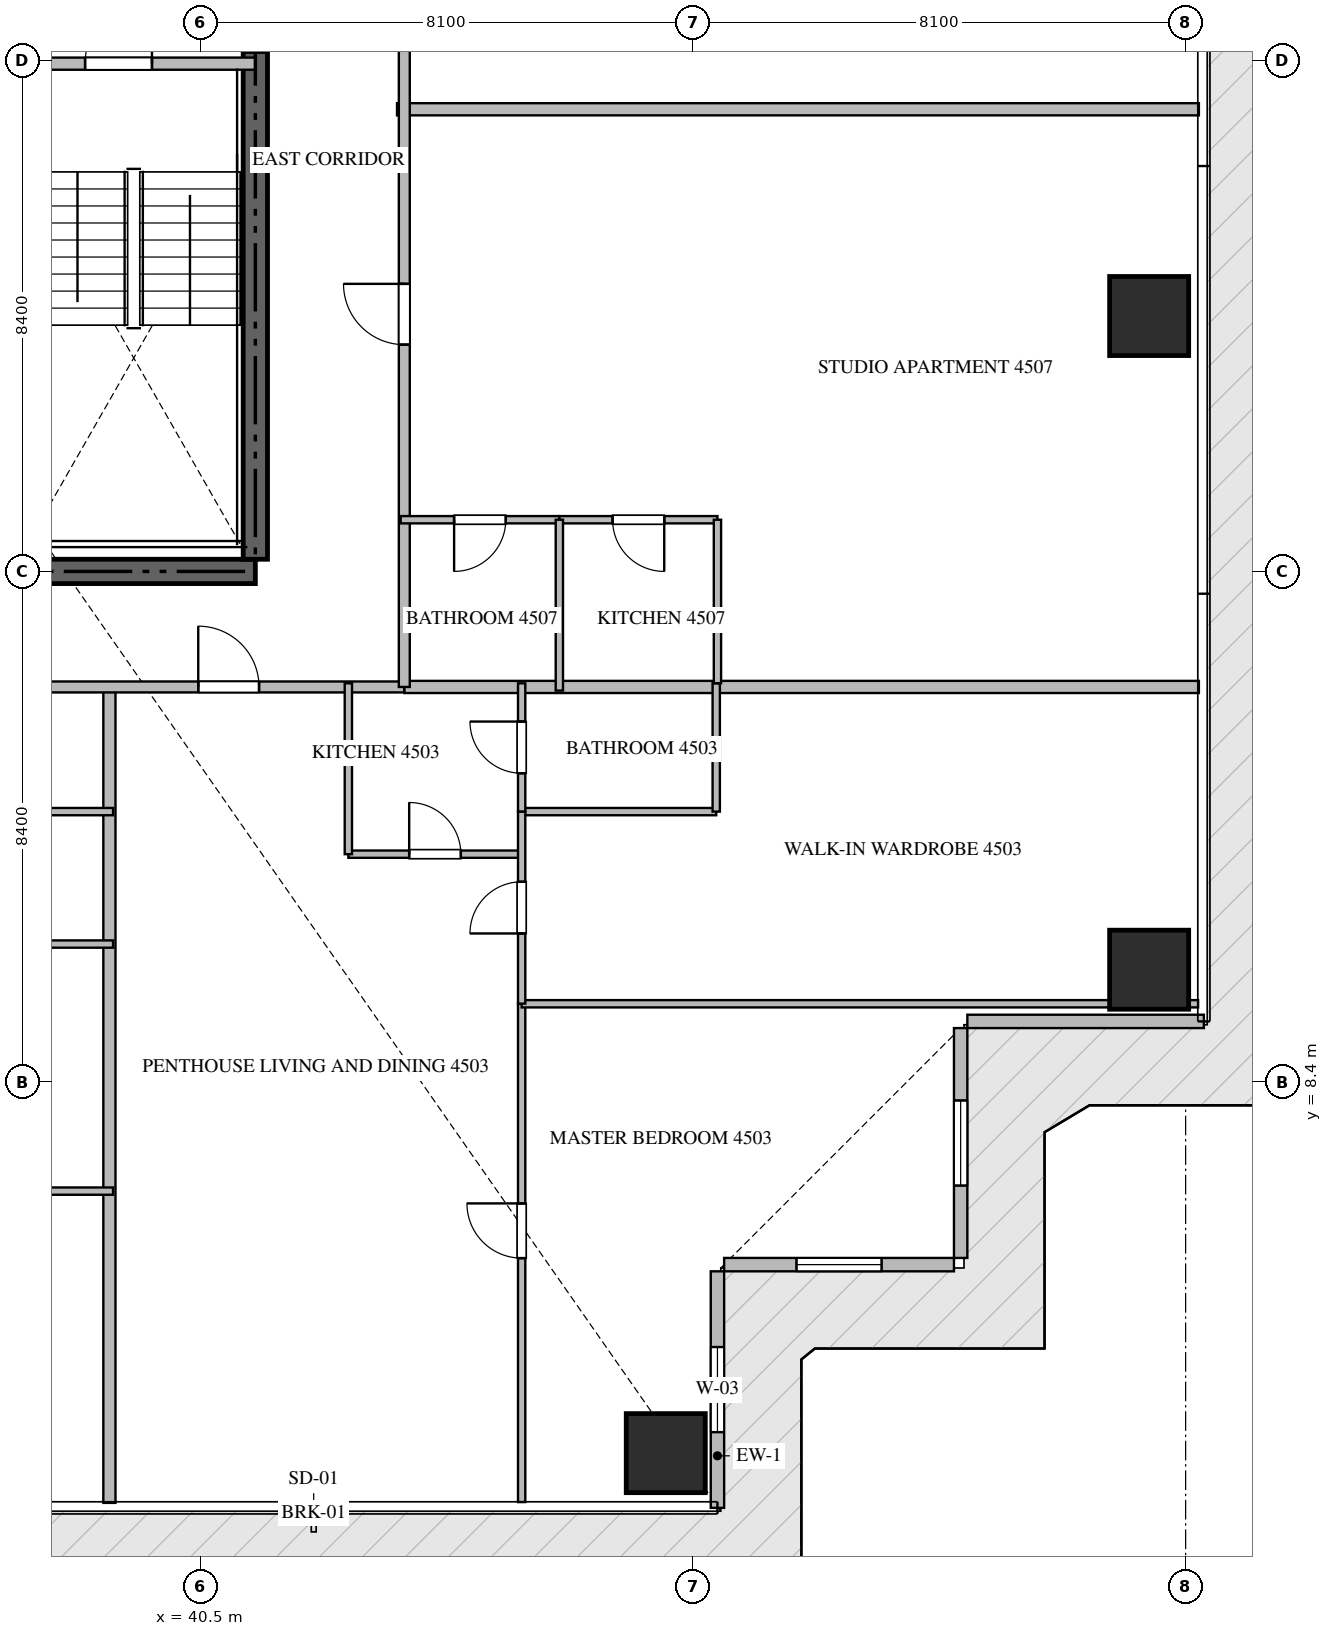
"""IFC4 building model, lengths in metres.
Left out: names, types, materials, properties, quantities, classifications, styles, units other than length and angle.
Written with IfcOpenShell. Run it as: python <this file> out.ifc"""

import sys

from ifc_helpers import new_model, si_unit, direction, frame, frame_2d, origin, origin_2d, place, context, subcontext, project, spatial, rectangle, extrude, source, transform, mapped, element, fill, save


model = new_model("IFC4")
c1 = context("Model", 3, precision=1e-05, world=origin(), true_north=direction((0.0, 1.0)))
c2 = subcontext(c1, "Body", "Model", "MODEL_VIEW")
j1 = project(units=[si_unit("LENGTHUNIT", "METRE"), si_unit("PLANEANGLEUNIT", "RADIAN")], contexts=[c1])
p1 = place(None, origin())
s1 = spatial("IfcSite", under=j1, at=p1, CompositionType="ELEMENT")
p2 = place(p1, origin())
s2 = spatial("IfcBuilding", under=s1, at=p2, CompositionType="ELEMENT")
p3 = place(p2, frame((0.0, 0.0, 180.15)))
s3 = spatial("IfcBuildingStorey", under=s2, at=p3, CompositionType="ELEMENT", Elevation=180.15)
p4 = place(p3, frame((23.4, 16.8, -0.26), z_axis=(0.0, 0.0, 1.0), x_axis=(1.0, 0.0, 0.0)))
e1 = element("IfcWall", 1, at=p4, inside=s3, PredefinedType="SHEAR", context=c2, shape_type="SweptSolid", body=[
    extrude(rectangle(XDim=18.0, YDim=0.4, at=frame_2d((9.0, 0.0))), origin(), (0.0, 0.0, 1.0), 3.748),
])
p5 = place(p3, frame((41.4, 17.0, -0.26), z_axis=(0.0, 0.0, 1.0), x_axis=(0.0, 1.0, 0.0)))
e2 = element("IfcWall", 2, at=p5, inside=s3, PredefinedType="SHEAR", context=c2, shape_type="SweptSolid", body=[
    extrude(rectangle(XDim=8.35, YDim=0.4, at=frame_2d((4.175, 0.0))), origin(), (0.0, 0.0, 1.0), 3.748),
])
m1 = source(origin(), c2, "Body", "SweptSolid", [
    extrude(rectangle(XDim=1.3, YDim=1.3, at=origin_2d()), origin(), (0.0, 0.0, 1.0), 3.75),
])
for number, where, z_axis, x_axis in (
    (3, (48.15, 2.3, -0.26), (0.0, 0.0, 1.0), (1.0, 0.0, 0.0)),
    (4, (56.1, 10.25, -0.26), (0.0, 0.0, 1.0), (1.0, 0.0, 0.0)),
    (5, (56.1, 21.0, -0.26), (0.0, 0.0, 1.0), (1.0, 0.0, 0.0)),
):
    element("IfcColumn", number, at=place(p3, frame(where, z_axis=z_axis, x_axis=x_axis)), inside=s3, PredefinedType="COLUMN", context=c2, shape_type="MappedRepresentation", body=[
        mapped(m1, transform((0.0, 0.0, 0.0), scale=1.0)),
    ])
p6 = place(p3, frame((49.0, 1.4, 0.0), z_axis=(0.0, 0.0, 1.0), x_axis=(0.0, 1.0, 0.0)))
e6 = element("IfcWall", 6, at=p6, inside=s3, PredefinedType="ELEMENTEDWALL", context=c2, shape_type="SweptSolid", body=[
    extrude(rectangle(XDim=3.89, YDim=0.22, at=frame_2d((1.945, 0.0))), origin(), (0.0, 0.0, 1.0), 3.475),
])
p7 = place(p6, frame((1.245, 0.0, 0.65)))
e7 = element("IfcOpeningElement", 7, at=p7, cuts=e6, PredefinedType="OPENING", context=c2, shape_type="SweptSolid", body=[
    extrude(rectangle(XDim=1.4, YDim=2.05, at=frame_2d((0.7, 1.025))), frame((0.0, 0.12, 0.0), z_axis=(0.0, -1.0, 0.0), x_axis=(1.0, 0.0, 0.0)), (0.0, 0.0, 1.0), 0.24),
])
p8 = place(p3, frame((49.11, 5.4, 0.0), z_axis=(0.0, 0.0, 1.0), x_axis=(1.0, 0.0, 0.0)))
e8 = element("IfcWall", 8, at=p8, inside=s3, PredefinedType="ELEMENTEDWALL", context=c2, shape_type="SweptSolid", body=[
    extrude(rectangle(XDim=3.78, YDim=0.22, at=frame_2d((1.89, 0.0))), origin(), (0.0, 0.0, 1.0), 3.475),
])
p9 = place(p8, frame((1.19, 0.0, 0.65)))
e9 = element("IfcOpeningElement", 9, at=p9, cuts=e8, PredefinedType="OPENING", context=c2, shape_type="SweptSolid", body=[
    extrude(rectangle(XDim=1.4, YDim=2.05, at=frame_2d((0.7, 1.025))), frame((0.0, 0.12, 0.0), z_axis=(0.0, -1.0, 0.0), x_axis=(1.0, 0.0, 0.0)), (0.0, 0.0, 1.0), 0.24),
])
p10 = place(p3, frame((53.0, 5.51, 0.0), z_axis=(0.0, 0.0, 1.0), x_axis=(0.0, 1.0, 0.0)))
e10 = element("IfcWall", 10, at=p10, inside=s3, PredefinedType="ELEMENTEDWALL", context=c2, shape_type="SweptSolid", body=[
    extrude(rectangle(XDim=3.78, YDim=0.22, at=frame_2d((1.89, 0.0))), origin(), (0.0, 0.0, 1.0), 3.475),
])
p11 = place(p10, frame((1.19, 0.0, 0.65)))
e11 = element("IfcOpeningElement", 11, at=p11, cuts=e10, PredefinedType="OPENING", context=c2, shape_type="SweptSolid", body=[
    extrude(rectangle(XDim=1.4, YDim=2.05, at=frame_2d((0.7, 1.025))), frame((0.0, 0.12, 0.0), z_axis=(0.0, -1.0, 0.0), x_axis=(1.0, 0.0, 0.0)), (0.0, 0.0, 1.0), 0.24),
])
p12 = place(p3, frame((53.11, 9.4, 0.0), z_axis=(0.0, 0.0, 1.0), x_axis=(1.0, 0.0, 0.0)))
e12 = element("IfcWall", 12, at=p12, inside=s3, PredefinedType="ELEMENTEDWALL", context=c2, shape_type="SweptSolid", body=[
    extrude(rectangle(XDim=3.89, YDim=0.22, at=frame_2d((1.945, 0.0))), origin(), (0.0, 0.0, 1.0), 3.475),
])
p13 = place(p3, frame((36.95, 25.15, 0.0), z_axis=(0.0, 0.0, 1.0), x_axis=(1.0, 0.0, 0.0)))
e13 = element("IfcWall", 13, at=p13, inside=s3, PredefinedType="STANDARD", context=c2, shape_type="SweptSolid", body=[
    extrude(rectangle(XDim=4.45, YDim=0.2, at=frame_2d((2.225, 0.0))), origin(), (0.0, 0.0, 1.0), 3.49),
])
p14 = place(p13, frame((1.65, 0.0, 0.0)))
e14 = element("IfcOpeningElement", 14, at=p14, cuts=e13, PredefinedType="OPENING", context=c2, shape_type="SweptSolid", body=[
    extrude(rectangle(XDim=1.1, YDim=2.15, at=frame_2d((0.55, 1.075))), frame((0.0, 0.11, 0.0), z_axis=(0.0, -1.0, 0.0), x_axis=(1.0, 0.0, 0.0)), (0.0, 0.0, 1.0), 0.22),
])
p15 = place(p3, frame((39.0, 1.482, 0.0), z_axis=(0.0, 0.0, 1.0), x_axis=(0.0, 1.0, 0.0)))
e15 = element("IfcWall", 15, at=p15, inside=s3, PredefinedType="PARTITIONING", context=c2, shape_type="SweptSolid", body=[
    extrude(rectangle(XDim=13.418, YDim=0.2, at=frame_2d((6.709, 0.0))), origin(), (0.0, 0.0, 1.0), 3.49),
])
p16 = place(p3, frame((43.73, 24.4, 0.0), z_axis=(0.0, 0.0, 1.0), x_axis=(1.0, 0.0, 0.0)))
e16 = element("IfcWall", 16, at=p16, inside=s3, PredefinedType="PARTITIONING", context=c2, shape_type="SweptSolid", body=[
    extrude(rectangle(XDim=13.188, YDim=0.2, at=frame_2d((6.594, 0.0))), origin(), (0.0, 0.0, 1.0), 3.49),
])
p17 = place(p3, frame((43.85, 14.9, 0.0), z_axis=(0.0, 0.0, 1.0), x_axis=(1.0, 0.0, 0.0)))
e17 = element("IfcWall", 17, at=p17, inside=s3, PredefinedType="PARTITIONING", context=c2, shape_type="SweptSolid", body=[
    extrude(rectangle(XDim=13.068, YDim=0.2, at=frame_2d((6.534, 0.0))), origin(), (0.0, 0.0, 1.0), 3.49),
])
p18 = place(p3, frame((20.952, 14.9, 0.0), z_axis=(0.0, 0.0, 1.0), x_axis=(1.0, 0.0, 0.0)))
e18 = element("IfcWall", 18, at=p18, inside=s3, PredefinedType="PARTITIONING", context=c2, shape_type="SweptSolid", body=[
    extrude(rectangle(XDim=22.896, YDim=0.18, at=frame_2d((11.448, 0.0))), origin(), (0.0, 0.0, 1.0), 3.49),
])
p19 = place(p18, frame((2.211, 0.0, 0.0)))
e19 = element("IfcOpeningElement", 19, at=p19, cuts=e18, PredefinedType="OPENING", context=c2, shape_type="SweptSolid", body=[
    extrude(rectangle(XDim=1.0, YDim=2.15, at=frame_2d((0.5, 1.075))), frame((0.0, 0.1, 0.0), z_axis=(0.0, -1.0, 0.0), x_axis=(1.0, 0.0, 0.0)), (0.0, 0.0, 1.0), 0.2),
])
p20 = place(p18, frame((6.7, 0.0, 0.0)))
e20 = element("IfcOpeningElement", 20, at=p20, cuts=e18, PredefinedType="OPENING", context=c2, shape_type="SweptSolid", body=[
    extrude(rectangle(XDim=1.0, YDim=2.15, at=frame_2d((0.5, 1.075))), frame((0.0, 0.1, 0.0), z_axis=(0.0, -1.0, 0.0), x_axis=(1.0, 0.0, 0.0)), (0.0, 0.0, 1.0), 0.2),
])
p21 = place(p18, frame((19.509, 0.0, 0.0)))
e21 = element("IfcOpeningElement", 21, at=p21, cuts=e18, PredefinedType="OPENING", context=c2, shape_type="SweptSolid", body=[
    extrude(rectangle(XDim=1.0, YDim=2.15, at=frame_2d((0.5, 1.075))), frame((0.0, 0.1, 0.0), z_axis=(0.0, -1.0, 0.0), x_axis=(1.0, 0.0, 0.0)), (0.0, 0.0, 1.0), 0.2),
])
p22 = place(p3, frame((43.85, 14.9, 0.0), z_axis=(0.0, 0.0, 1.0), x_axis=(0.0, 1.0, 0.0)))
e22 = element("IfcWall", 22, at=p22, inside=s3, PredefinedType="PARTITIONING", context=c2, shape_type="SweptSolid", body=[
    extrude(rectangle(XDim=18.7, YDim=0.18, at=frame_2d((9.35, 0.0))), origin(), (0.0, 0.0, 1.0), 3.49),
])
p23 = place(p22, frame((5.629, 0.0, 0.0)))
e23 = element("IfcOpeningElement", 23, at=p23, cuts=e22, PredefinedType="OPENING", context=c2, shape_type="SweptSolid", body=[
    extrude(rectangle(XDim=1.0, YDim=2.15, at=frame_2d((0.5, 1.075))), frame((0.0, 0.1, 0.0), z_axis=(0.0, -1.0, 0.0), x_axis=(1.0, 0.0, 0.0)), (0.0, 0.0, 1.0), 0.2),
])
p24 = place(p22, frame((10.709, 0.0, 0.0)))
e24 = element("IfcOpeningElement", 24, at=p24, cuts=e22, PredefinedType="OPENING", context=c2, shape_type="SweptSolid", body=[
    extrude(rectangle(XDim=1.0, YDim=2.15, at=frame_2d((0.5, 1.075))), frame((0.0, 0.1, 0.0), z_axis=(0.0, -1.0, 0.0), x_axis=(1.0, 0.0, 0.0)), (0.0, 0.0, 1.0), 0.2),
])
for number, where, z_axis, x_axis in (
    (25, (30.69, 6.609, 0.0), (0.0, 0.0, 1.0), (1.0, 0.0, 0.0)),
    (26, (30.69, 10.672, 0.0), (0.0, 0.0, 1.0), (1.0, 0.0, 0.0)),
    (27, (30.69, 12.85, 0.0), (0.0, 0.0, 1.0), (1.0, 0.0, 0.0)),
):
    element("IfcWall", number, at=place(p3, frame(where, z_axis=z_axis, x_axis=x_axis)), inside=s3, PredefinedType="PARTITIONING", context=c2, shape_type="SweptSolid", body=[
        extrude(rectangle(XDim=8.37, YDim=0.12, at=frame_2d((4.185, 0.0))), origin(), (0.0, 0.0, 1.0), 3.49),
    ])
p25 = place(p3, frame((42.93, 12.15, 0.0), z_axis=(0.0, 0.0, 1.0), x_axis=(1.0, 0.0, 0.0)))
e28 = element("IfcWall", 28, at=p25, inside=s3, PredefinedType="PARTITIONING", context=c2, shape_type="SweptSolid", body=[
    extrude(rectangle(XDim=2.85, YDim=0.12, at=frame_2d((1.425, 0.0))), origin(), (0.0, 0.0, 1.0), 3.49),
])
p26 = place(p25, frame((1.0, 0.0, 0.0)))
e29 = element("IfcOpeningElement", 29, at=p26, cuts=e28, PredefinedType="OPENING", context=c2, shape_type="SweptSolid", body=[
    extrude(rectangle(XDim=0.85, YDim=2.1, at=frame_2d((0.425, 1.05))), frame((0.0, 0.07, 0.0), z_axis=(0.0, -1.0, 0.0), x_axis=(1.0, 0.0, 0.0)), (0.0, 0.0, 1.0), 0.14),
])
p27 = place(p3, frame((42.93, 12.15, 0.0), z_axis=(0.0, 0.0, 1.0), x_axis=(0.0, 1.0, 0.0)))
e30 = element("IfcWall", 30, at=p27, inside=s3, PredefinedType="PARTITIONING", context=c2, shape_type="SweptSolid", body=[
    extrude(rectangle(XDim=2.81, YDim=0.12, at=frame_2d((1.405, 0.0))), origin(), (0.0, 0.0, 1.0), 3.49),
])
p28 = place(p3, frame((45.78, 1.495, 0.0), z_axis=(0.0, 0.0, 1.0), x_axis=(0.0, 1.0, 0.0)))
e31 = element("IfcWall", 31, at=p28, inside=s3, PredefinedType="PARTITIONING", context=c2, shape_type="SweptSolid", body=[
    extrude(rectangle(XDim=8.195, YDim=0.12, at=frame_2d((4.097, 0.0))), origin(), (0.0, 0.0, 1.0), 3.49),
])
p29 = place(p28, frame((4.012, 0.0, 0.0)))
e32 = element("IfcOpeningElement", 32, at=p29, cuts=e31, PredefinedType="OPENING", context=c2, shape_type="SweptSolid", body=[
    extrude(rectangle(XDim=0.9, YDim=2.1, at=frame_2d((0.45, 1.05))), frame((0.0, 0.07, 0.0), z_axis=(0.0, -1.0, 0.0), x_axis=(1.0, 0.0, 0.0)), (0.0, 0.0, 1.0), 0.14),
])
p30 = place(p3, frame((45.78, 9.69, 0.0), z_axis=(0.0, 0.0, 1.0), x_axis=(1.0, 0.0, 0.0)))
e33 = element("IfcWall", 33, at=p30, inside=s3, PredefinedType="PARTITIONING", context=c2, shape_type="SweptSolid", body=[
    extrude(rectangle(XDim=11.125, YDim=0.12, at=frame_2d((5.562, 0.0))), origin(), (0.0, 0.0, 1.0), 3.49),
])
p31 = place(p3, frame((45.78, 12.85, 0.0), z_axis=(0.0, 0.0, 1.0), x_axis=(1.0, 0.0, 0.0)))
e34 = element("IfcWall", 34, at=p31, inside=s3, PredefinedType="PARTITIONING", context=c2, shape_type="SweptSolid", body=[
    extrude(rectangle(XDim=3.2, YDim=0.12, at=frame_2d((1.6, 0.0))), origin(), (0.0, 0.0, 1.0), 3.49),
])
p32 = place(p3, frame((48.98, 12.85, 0.0), z_axis=(0.0, 0.0, 1.0), x_axis=(0.0, 1.0, 0.0)))
e35 = element("IfcWall", 35, at=p32, inside=s3, PredefinedType="PARTITIONING", context=c2, shape_type="SweptSolid", body=[
    extrude(rectangle(XDim=2.11, YDim=0.12, at=frame_2d((1.055, 0.0))), origin(), (0.0, 0.0, 1.0), 3.49),
])
p33 = place(p3, frame((45.78, 9.692, 0.0), z_axis=(0.0, 0.0, 1.0), x_axis=(0.0, 1.0, 0.0)))
e36 = element("IfcWall", 36, at=p33, inside=s3, PredefinedType="PARTITIONING", context=c2, shape_type="SweptSolid", body=[
    extrude(rectangle(XDim=3.158, YDim=0.12, at=frame_2d((1.579, 0.0))), origin(), (0.0, 0.0, 1.0), 3.49),
])
p34 = place(p33, frame((1.154, 0.0, 0.0)))
e37 = element("IfcOpeningElement", 37, at=p34, cuts=e36, PredefinedType="OPENING", context=c2, shape_type="SweptSolid", body=[
    extrude(rectangle(XDim=0.85, YDim=2.1, at=frame_2d((0.425, 1.05))), frame((0.0, 0.07, 0.0), z_axis=(0.0, -1.0, 0.0), x_axis=(1.0, 0.0, 0.0)), (0.0, 0.0, 1.0), 0.14),
])
p35 = place(p3, frame((45.78, 12.852, 0.0), z_axis=(0.0, 0.0, 1.0), x_axis=(0.0, 1.0, 0.0)))
e38 = element("IfcWall", 38, at=p35, inside=s3, PredefinedType="PARTITIONING", context=c2, shape_type="SweptSolid", body=[
    extrude(rectangle(XDim=2.108, YDim=0.12, at=frame_2d((1.054, 0.0))), origin(), (0.0, 0.0, 1.0), 3.49),
])
p36 = place(p35, frame((0.629, 0.0, 0.0)))
e39 = element("IfcOpeningElement", 39, at=p36, cuts=e38, PredefinedType="OPENING", context=c2, shape_type="SweptSolid", body=[
    extrude(rectangle(XDim=0.85, YDim=2.1, at=frame_2d((0.425, 1.05))), frame((0.0, 0.07, 0.0), z_axis=(0.0, -1.0, 0.0), x_axis=(1.0, 0.0, 0.0)), (0.0, 0.0, 1.0), 0.14),
])
p37 = place(p3, frame((49.0, 17.65, 0.0), z_axis=(0.0, 0.0, 1.0), x_axis=(-1.0, 0.0, 0.0)))
e40 = element("IfcWall", 40, at=p37, inside=s3, PredefinedType="PARTITIONING", context=c2, shape_type="SweptSolid", body=[
    extrude(rectangle(XDim=2.6, YDim=0.12, at=frame_2d((1.3, 0.0))), origin(), (0.0, 0.0, 1.0), 3.49),
])
p38 = place(p37, frame((0.875, 0.0, 0.0)))
e41 = element("IfcOpeningElement", 41, at=p38, cuts=e40, PredefinedType="OPENING", context=c2, shape_type="SweptSolid", body=[
    extrude(rectangle(XDim=0.85, YDim=2.1, at=frame_2d((0.425, 1.05))), frame((0.0, 0.07, 0.0), z_axis=(0.0, -1.0, 0.0), x_axis=(1.0, 0.0, 0.0)), (0.0, 0.0, 1.0), 0.14),
])
p39 = place(p3, frame((46.398, 17.65, 0.0), z_axis=(0.0, 0.0, 1.0), x_axis=(-1.0, 0.0, 0.0)))
e42 = element("IfcWall", 42, at=p39, inside=s3, PredefinedType="PARTITIONING", context=c2, shape_type="SweptSolid", body=[
    extrude(rectangle(XDim=2.608, YDim=0.12, at=frame_2d((1.304, 0.0))), origin(), (0.0, 0.0, 1.0), 3.49),
])
p40 = place(p39, frame((0.879, 0.0, 0.0)))
e43 = element("IfcOpeningElement", 43, at=p40, cuts=e42, PredefinedType="OPENING", context=c2, shape_type="SweptSolid", body=[
    extrude(rectangle(XDim=0.85, YDim=2.1, at=frame_2d((0.425, 1.05))), frame((0.0, 0.07, 0.0), z_axis=(0.0, -1.0, 0.0), x_axis=(1.0, 0.0, 0.0)), (0.0, 0.0, 1.0), 0.14),
])
p41 = place(p3, frame((46.4, 14.84, 0.0), z_axis=(0.0, 0.0, 1.0), x_axis=(0.0, 1.0, 0.0)))
e44 = element("IfcWall", 44, at=p41, inside=s3, PredefinedType="PARTITIONING", context=c2, shape_type="SweptSolid", body=[
    extrude(rectangle(XDim=2.81, YDim=0.12, at=frame_2d((1.405, 0.0))), origin(), (0.0, 0.0, 1.0), 3.49),
])
p42 = place(p3, frame((49.0, 14.962, 0.0), z_axis=(0.0, 0.0, 1.0), x_axis=(0.0, 1.0, 0.0)))
e45 = element("IfcWall", 45, at=p42, inside=s3, PredefinedType="PARTITIONING", context=c2, shape_type="SweptSolid", body=[
    extrude(rectangle(XDim=2.688, YDim=0.12, at=frame_2d((1.344, 0.0))), origin(), (0.0, 0.0, 1.0), 3.49),
])
m2 = source(origin(), c2, "Body", "SweptSolid", [
    extrude(rectangle(XDim=1.4, YDim=2.05, at=frame_2d((0.7, 1.025))), frame((0.0, 0.03, 0.0), z_axis=(0.0, -1.0, 0.0), x_axis=(1.0, 0.0, 0.0)), (0.0, 0.0, 1.0), 0.06),
])
p43 = place(p7, origin())
e46 = element("IfcWindow", 46, at=p43, inside=s3, PartitioningType="SINGLE_PANEL", PredefinedType="WINDOW", context=c2, shape_type="MappedRepresentation", body=[
    mapped(m2, transform((0.0, 0.0, 0.0), scale=1.0)),
])
fill(e7, e46)
p44 = place(p9, origin())
e47 = element("IfcWindow", 47, at=p44, inside=s3, PartitioningType="SINGLE_PANEL", PredefinedType="WINDOW", context=c2, shape_type="MappedRepresentation", body=[
    mapped(m2, transform((0.0, 0.0, 0.0), scale=1.0)),
])
fill(e9, e47)
p45 = place(p11, origin())
e48 = element("IfcWindow", 48, at=p45, inside=s3, PartitioningType="SINGLE_PANEL", PredefinedType="WINDOW", context=c2, shape_type="MappedRepresentation", body=[
    mapped(m2, transform((0.0, 0.0, 0.0), scale=1.0)),
])
fill(e11, e48)
m3 = source(origin(), c2, "Body", "SweptSolid", [
    extrude(rectangle(XDim=1.1, YDim=2.15, at=frame_2d((0.55, 1.075))), frame((0.0, 0.025, 0.0), z_axis=(0.0, -1.0, 0.0), x_axis=(1.0, 0.0, 0.0)), (0.0, 0.0, 1.0), 0.05),
])
p46 = place(p14, origin())
e49 = element("IfcDoor", 49, at=p46, inside=s3, OperationType="SINGLE_SWING_RIGHT", PredefinedType="DOOR", context=c2, shape_type="MappedRepresentation", body=[
    mapped(m3, transform((0.0, 0.0, 0.0), scale=1.0)),
])
fill(e14, e49)
m4 = source(origin(), c2, "Body", "SweptSolid", [
    extrude(rectangle(XDim=1.0, YDim=2.15, at=frame_2d((0.5, 1.075))), frame((0.0, 0.025, 0.0), z_axis=(0.0, -1.0, 0.0), x_axis=(1.0, 0.0, 0.0)), (0.0, 0.0, 1.0), 0.05),
])
p47 = place(p21, origin())
e50 = element("IfcDoor", 50, at=p47, inside=s3, OperationType="SINGLE_SWING_LEFT", PredefinedType="DOOR", context=c2, shape_type="MappedRepresentation", body=[
    mapped(m4, transform((0.0, 0.0, 0.0), scale=1.0)),
])
fill(e21, e50)
p48 = place(p23, origin())
e51 = element("IfcDoor", 51, at=p48, inside=s3, OperationType="SINGLE_SWING_RIGHT", PredefinedType="DOOR", context=c2, shape_type="MappedRepresentation", body=[
    mapped(m4, transform((0.0, 0.0, 0.0), scale=1.0)),
])
fill(e23, e51)
m5 = source(origin(), c2, "Body", "SweptSolid", [
    extrude(rectangle(XDim=0.85, YDim=2.1, at=frame_2d((0.425, 1.05))), frame((0.0, 0.025, 0.0), z_axis=(0.0, -1.0, 0.0), x_axis=(1.0, 0.0, 0.0)), (0.0, 0.0, 1.0), 0.05),
])
p49 = place(p26, origin())
e52 = element("IfcDoor", 52, at=p49, inside=s3, OperationType="SINGLE_SWING_LEFT", PredefinedType="DOOR", context=c2, shape_type="MappedRepresentation", body=[
    mapped(m5, transform((0.0, 0.0, 0.0), scale=1.0)),
])
fill(e29, e52)
m6 = source(origin(), c2, "Body", "SweptSolid", [
    extrude(rectangle(XDim=0.9, YDim=2.1, at=frame_2d((0.45, 1.05))), frame((0.0, 0.025, 0.0), z_axis=(0.0, -1.0, 0.0), x_axis=(1.0, 0.0, 0.0)), (0.0, 0.0, 1.0), 0.05),
])
p50 = place(p29, origin())
e53 = element("IfcDoor", 53, at=p50, inside=s3, OperationType="SINGLE_SWING_RIGHT", PredefinedType="DOOR", context=c2, shape_type="MappedRepresentation", body=[
    mapped(m6, transform((0.0, 0.0, 0.0), scale=1.0)),
])
fill(e32, e53)
p51 = place(p34, origin())
e54 = element("IfcDoor", 54, at=p51, inside=s3, OperationType="SINGLE_SWING_LEFT", PredefinedType="DOOR", context=c2, shape_type="MappedRepresentation", body=[
    mapped(m5, transform((0.0, 0.0, 0.0), scale=1.0)),
])
fill(e37, e54)
p52 = place(p36, origin())
e55 = element("IfcDoor", 55, at=p52, inside=s3, OperationType="SINGLE_SWING_RIGHT", PredefinedType="DOOR", context=c2, shape_type="MappedRepresentation", body=[
    mapped(m5, transform((0.0, 0.0, 0.0), scale=1.0)),
])
fill(e39, e55)
p53 = place(p38, origin())
e56 = element("IfcDoor", 56, at=p53, inside=s3, OperationType="SINGLE_SWING_LEFT", PredefinedType="DOOR", context=c2, shape_type="MappedRepresentation", body=[
    mapped(m5, transform((0.0, 0.0, 0.0), scale=1.0)),
])
fill(e41, e56)
p54 = place(p40, origin())
e57 = element("IfcDoor", 57, at=p54, inside=s3, OperationType="SINGLE_SWING_RIGHT", PredefinedType="DOOR", context=c2, shape_type="MappedRepresentation", body=[
    mapped(m5, transform((0.0, 0.0, 0.0), scale=1.0)),
])
fill(e43, e57)
save(model, sys.argv[1])
